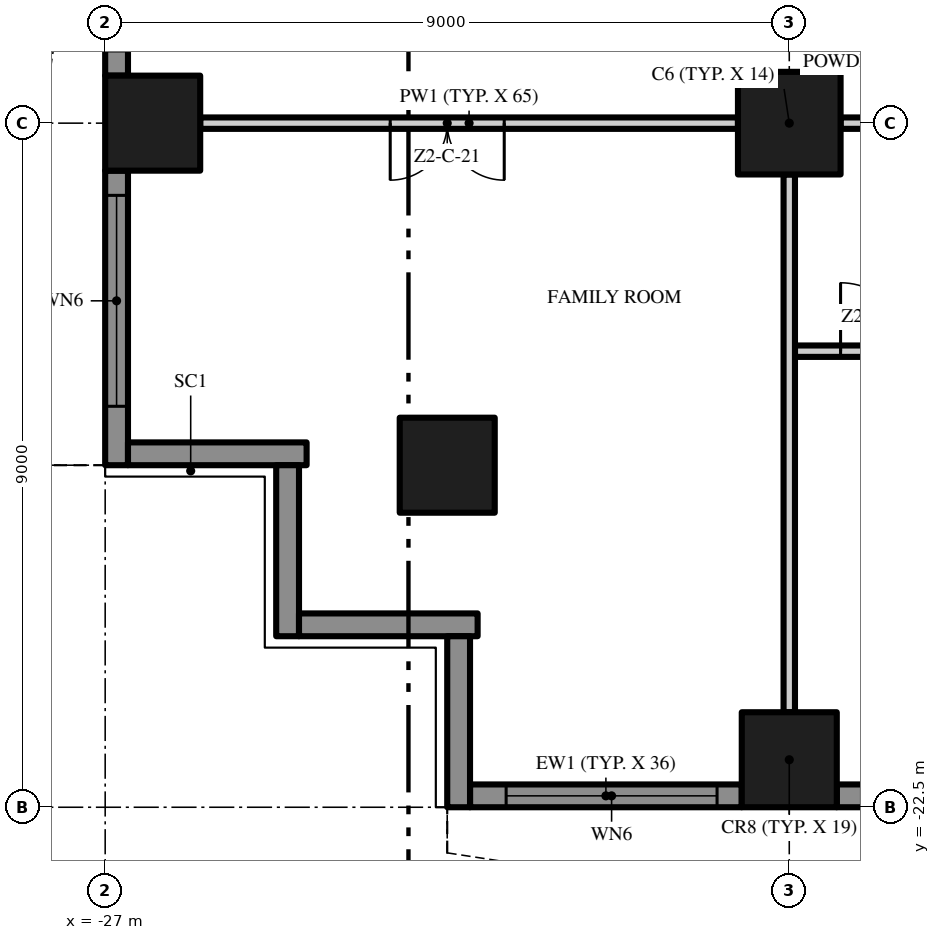
"""IFC4 building model, lengths in metres.
Left out: names, types, materials, properties, quantities, classifications, styles, units other than length and angle.
Written with IfcOpenShell. Run it as: python <this file> out.ifc"""

import sys

from ifc_helpers import new_model, si_unit, direction, frame, frame_2d, origin, origin_2d, place, context, subcontext, project, spatial, polyline, rectangle, outline, extrude, element, fill, save


model = new_model("IFC4")
c1 = context("Model", 3, precision=1e-05, world=origin(), true_north=direction((0.0, 1.0)))
c2 = subcontext(c1, "Body", "Model", "MODEL_VIEW")
j1 = project(units=[si_unit("LENGTHUNIT", "METRE"), si_unit("PLANEANGLEUNIT", "RADIAN")], contexts=[c1])
p1 = place(None, origin())
s1 = spatial("IfcSite", under=j1, at=p1, CompositionType="ELEMENT")
p2 = place(p1, origin())
s2 = spatial("IfcBuilding", under=s1, at=p2, CompositionType="ELEMENT")
p3 = place(p2, frame((0.0, 0.0, 99.8)))
s3 = spatial("IfcBuildingStorey", under=s2, at=p3, CompositionType="ELEMENT", Elevation=99.8)
p4 = place(p3, frame((-18.0, -13.5, 0.0), z_axis=(0.0, 0.0, 1.0), x_axis=(1.0, 0.0, 0.0)))
e1 = element("IfcColumn", 1, at=p4, inside=s3, PredefinedType="COLUMN", context=c2, shape_type="SweptSolid", body=[
    extrude(rectangle(XDim=1.35, YDim=1.35, at=origin_2d()), origin(), (0.0, 0.0, 1.0), 3.5),
])
for number, where, z_axis, x_axis in (
    (2, (-18.0, -21.875, 0.0), (0.0, 0.0, 1.0), (1.0, 0.0, 0.0)),
    (3, (-26.375, -13.5, 0.0), (0.0, 0.0, 1.0), (1.0, 0.0, 0.0)),
    (4, (-22.5, -18.0, 0.0), (0.0, 0.0, 1.0), (1.0, 0.0, 0.0)),
):
    element("IfcColumn", number, at=place(p3, frame(where, z_axis=z_axis, x_axis=x_axis)), inside=s3, PredefinedType="COLUMN", context=c2, shape_type="SweptSolid", body=[
        extrude(rectangle(XDim=1.25, YDim=1.25, at=origin_2d()), origin(), (0.0, 0.0, 1.0), 3.5),
    ])
p5 = place(p3, frame((-18.625, -22.35, 0.0), z_axis=(0.0, 0.0, 1.0), x_axis=(-1.0, 0.0, 0.0)))
e5 = element("IfcWall", 5, at=p5, inside=s3, PredefinedType="SOLIDWALL", context=c2, shape_type="SweptSolid", body=[
    extrude(rectangle(XDim=3.575, YDim=0.3, at=frame_2d((1.788, 0.0))), origin(), (0.0, 0.0, 1.0), 3.5),
])
p6 = place(p5, frame((0.325, 0.0, 0.45)))
e6 = element("IfcOpeningElement", 6, at=p6, cuts=e5, PredefinedType="OPENING", context=c2, shape_type="SweptSolid", body=[
    extrude(rectangle(XDim=2.775, YDim=2.65, at=frame_2d((1.387, 1.325))), frame((0.0, 0.16, 0.0), z_axis=(0.0, -1.0, 0.0), x_axis=(1.0, 0.0, 0.0)), (0.0, 0.0, 1.0), 0.32),
])
p7 = place(p3, frame((-9.625, -22.35, 0.0), z_axis=(0.0, 0.0, 1.0), x_axis=(-1.0, 0.0, 0.0)))
e7 = element("IfcWall", 7, at=p7, inside=s3, PredefinedType="SOLIDWALL", context=c2, shape_type="SweptSolid", body=[
    extrude(rectangle(XDim=7.75, YDim=0.3, at=frame_2d((3.875, 0.0))), origin(), (0.0, 0.0, 1.0), 3.5),
])
p8 = place(p7, frame((4.65, 0.0, 0.0)))
e8 = element("IfcOpeningElement", 8, at=p8, cuts=e7, PredefinedType="OPENING", context=c2, shape_type="SweptSolid", body=[
    extrude(rectangle(XDim=2.775, YDim=2.4, at=frame_2d((1.387, 1.2))), frame((0.0, 0.16, 0.0), z_axis=(0.0, -1.0, 0.0), x_axis=(1.0, 0.0, 0.0)), (0.0, 0.0, 1.0), 0.32),
])
p9 = place(p7, frame((0.325, 0.0, 0.45)))
e9 = element("IfcOpeningElement", 9, at=p9, cuts=e7, PredefinedType="OPENING", context=c2, shape_type="SweptSolid", body=[
    extrude(rectangle(XDim=2.775, YDim=2.65, at=frame_2d((1.387, 1.325))), frame((0.0, 0.16, 0.0), z_axis=(0.0, -1.0, 0.0), x_axis=(1.0, 0.0, 0.0)), (0.0, 0.0, 1.0), 0.32),
])
p10 = place(p3, frame((-26.85, -12.875, 0.0), z_axis=(0.0, 0.0, 1.0), x_axis=(0.0, 1.0, 0.0)))
e10 = element("IfcWall", 10, at=p10, inside=s3, PredefinedType="SOLIDWALL", context=c2, shape_type="SweptSolid", body=[
    extrude(rectangle(XDim=7.75, YDim=0.3, at=frame_2d((3.875, 0.0))), origin(), (0.0, 0.0, 1.0), 3.5),
])
p11 = place(p10, frame((4.65, 0.0, 0.0)))
e11 = element("IfcOpeningElement", 11, at=p11, cuts=e10, PredefinedType="OPENING", context=c2, shape_type="SweptSolid", body=[
    extrude(rectangle(XDim=2.775, YDim=2.4, at=frame_2d((1.387, 1.2))), frame((0.0, 0.16, 0.0), z_axis=(0.0, -1.0, 0.0), x_axis=(1.0, 0.0, 0.0)), (0.0, 0.0, 1.0), 0.32),
])
p12 = place(p10, frame((0.325, 0.0, 0.45)))
e12 = element("IfcOpeningElement", 12, at=p12, cuts=e10, PredefinedType="OPENING", context=c2, shape_type="SweptSolid", body=[
    extrude(rectangle(XDim=2.775, YDim=2.65, at=frame_2d((1.387, 1.325))), frame((0.0, 0.16, 0.0), z_axis=(0.0, -1.0, 0.0), x_axis=(1.0, 0.0, 0.0)), (0.0, 0.0, 1.0), 0.32),
])
p13 = place(p3, frame((-26.85, -18.0, 0.0), z_axis=(0.0, 0.0, 1.0), x_axis=(0.0, 1.0, 0.0)))
e13 = element("IfcWall", 13, at=p13, inside=s3, PredefinedType="SOLIDWALL", context=c2, shape_type="SweptSolid", body=[
    extrude(rectangle(XDim=3.875, YDim=0.3, at=frame_2d((1.938, 0.0))), origin(), (0.0, 0.0, 1.0), 3.5),
])
p14 = place(p13, frame((0.775, 0.0, 0.45)))
e14 = element("IfcOpeningElement", 14, at=p14, cuts=e13, PredefinedType="OPENING", context=c2, shape_type="SweptSolid", body=[
    extrude(rectangle(XDim=2.775, YDim=2.65, at=frame_2d((1.387, 1.325))), frame((0.0, 0.16, 0.0), z_axis=(0.0, -1.0, 0.0), x_axis=(1.0, 0.0, 0.0)), (0.0, 0.0, 1.0), 0.32),
])
p15 = place(p3, frame((-24.35, -17.85, 0.0), z_axis=(0.0, 0.0, 1.0), x_axis=(-1.0, 0.0, 0.0)))
e15 = element("IfcWall", 15, at=p15, inside=s3, PredefinedType="SOLIDWALL", context=c2, shape_type="SweptSolid", body=[
    extrude(rectangle(XDim=2.35, YDim=0.3, at=frame_2d((1.175, 0.0))), origin(), (0.0, 0.0, 1.0), 3.5),
])
p16 = place(p3, frame((-24.6, -20.25, 0.0), z_axis=(0.0, 0.0, 1.0), x_axis=(0.0, 1.0, 0.0)))
e16 = element("IfcWall", 16, at=p16, inside=s3, PredefinedType="SOLIDWALL", context=c2, shape_type="SweptSolid", body=[
    extrude(rectangle(XDim=2.25, YDim=0.3, at=frame_2d((1.125, 0.0))), origin(), (0.0, 0.0, 1.0), 3.5),
])
p17 = place(p3, frame((-22.1, -20.1, 0.0), z_axis=(0.0, 0.0, 1.0), x_axis=(-1.0, 0.0, 0.0)))
e17 = element("IfcWall", 17, at=p17, inside=s3, PredefinedType="SOLIDWALL", context=c2, shape_type="SweptSolid", body=[
    extrude(rectangle(XDim=2.35, YDim=0.3, at=frame_2d((1.175, 0.0))), origin(), (0.0, 0.0, 1.0), 3.5),
])
p18 = place(p3, frame((-22.35, -22.5, 0.0), z_axis=(0.0, 0.0, 1.0), x_axis=(0.0, 1.0, 0.0)))
e18 = element("IfcWall", 18, at=p18, inside=s3, PredefinedType="SOLIDWALL", context=c2, shape_type="SweptSolid", body=[
    extrude(rectangle(XDim=2.25, YDim=0.3, at=frame_2d((1.125, 0.0))), origin(), (0.0, 0.0, 1.0), 3.5),
])
p19 = place(p3, origin())
e19 = element("IfcWall", 19, at=p19, inside=s3, PredefinedType="USERDEFINED", context=c2, shape_type="SweptSolid", body=[
    extrude(outline(polyline([(-22.5, -23.1), (-21.0, -23.329), (-19.5, -23.929), (-18.0, -24.671), (-16.5, -25.271), (-15.0, -25.5), (-13.5, -25.271), (-12.0, -24.671), (-10.5, -23.929), (-9.0, -23.329), (-7.5, -23.1), (-6.0, -23.329), (-4.5, -23.929), (-3.0, -24.671), (-1.5, -25.271), (0.0, -25.5), (1.5, -25.271), (3.0, -24.671), (4.5, -23.929), (6.0, -23.329), (7.5, -23.1), (9.0, -23.329), (10.5, -23.929), (12.0, -24.671), (13.5, -25.271), (15.0, -25.5), (16.5, -25.271), (18.0, -24.671), (19.5, -23.929), (21.0, -23.329), (22.5, -23.1), (22.462, -22.853), (20.934, -23.086), (19.398, -23.701), (17.898, -24.442), (16.434, -25.028), (15.0, -25.247), (13.566, -25.028), (12.102, -24.442), (10.602, -23.701), (9.066, -23.086), (7.5, -22.847), (5.934, -23.086), (4.398, -23.701), (2.898, -24.442), (1.434, -25.028), (0.0, -25.247), (-1.434, -25.028), (-2.898, -24.442), (-4.398, -23.701), (-5.934, -23.086), (-7.5, -22.847), (-9.066, -23.086), (-10.602, -23.701), (-12.102, -24.442), (-13.566, -25.028), (-15.0, -25.247), (-16.434, -25.028), (-17.898, -24.442), (-19.398, -23.701), (-20.934, -23.086), (-22.462, -22.853), (-22.5, -23.1)])), origin(), (0.0, 0.0, 1.0), 0.9),
])
p20 = place(p3, origin())
e20 = element("IfcWall", 20, at=p20, inside=s3, PredefinedType="USERDEFINED", context=c2, shape_type="SweptSolid", body=[
    extrude(outline(polyline([(-27.6, 18.0), (-27.829, 16.5), (-28.429, 15.0), (-29.171, 13.5), (-29.771, 12.0), (-30.0, 10.5), (-29.771, 9.0), (-29.171, 7.5), (-28.429, 6.0), (-27.829, 4.5), (-27.6, 3.0), (-27.829, 1.5), (-28.429, 0.0), (-29.171, -1.5), (-29.771, -3.0), (-30.0, -4.5), (-29.771, -6.0), (-29.171, -7.5), (-28.429, -9.0), (-27.829, -10.5), (-27.6, -12.0), (-27.829, -13.5), (-28.429, -15.0), (-29.171, -16.5), (-29.771, -18.0), (-29.539, -18.093), (-28.942, -16.602), (-28.201, -15.102), (-27.586, -13.566), (-27.347, -12.0), (-27.586, -10.434), (-28.201, -8.898), (-28.942, -7.398), (-29.528, -5.934), (-29.747, -4.5), (-29.528, -3.066), (-28.942, -1.602), (-28.201, -0.102), (-27.586, 1.434), (-27.347, 3.0), (-27.586, 4.566), (-28.201, 6.102), (-28.942, 7.602), (-29.528, 9.066), (-29.747, 10.5), (-29.528, 11.934), (-28.942, 13.398), (-28.201, 14.898), (-27.586, 16.434), (-27.353, 17.962), (-27.6, 18.0)])), origin(), (0.0, 0.0, 1.0), 0.9),
])
p21 = place(p3, frame((-17.925, -16.5, 0.0), z_axis=(0.0, 0.0, 1.0), x_axis=(1.0, 0.0, 0.0)))
e21 = element("IfcWall", 21, at=p21, inside=s3, PredefinedType="PARTITIONING", context=c2, shape_type="SweptSolid", body=[
    extrude(rectangle(XDim=2.1, YDim=0.15, at=frame_2d((1.05, 0.0))), origin(), (0.0, 0.0, 1.0), 3.5),
])
p22 = place(p21, frame((0.6, 0.0, 0.0)))
e22 = element("IfcOpeningElement", 22, at=p22, cuts=e21, PredefinedType="OPENING", context=c2, shape_type="SweptSolid", body=[
    extrude(rectangle(XDim=0.9, YDim=2.1, at=frame_2d((0.45, 1.05))), frame((0.0, 0.085, 0.0), z_axis=(0.0, -1.0, 0.0), x_axis=(1.0, 0.0, 0.0)), (0.0, 0.0, 1.0), 0.17),
])
p23 = place(p3, frame((-18.675, -13.5, 0.0), z_axis=(0.0, 0.0, 1.0), x_axis=(-1.0, 0.0, 0.0)))
e23 = element("IfcWall", 23, at=p23, inside=s3, PredefinedType="PARTITIONING", context=c2, shape_type="SweptSolid", body=[
    extrude(rectangle(XDim=7.075, YDim=0.15, at=frame_2d((3.538, 0.0))), origin(), (0.0, 0.0, 1.0), 3.5),
])
p24 = place(p23, frame((3.075, 0.0, 0.0)))
e24 = element("IfcOpeningElement", 24, at=p24, cuts=e23, PredefinedType="OPENING", context=c2, shape_type="SweptSolid", body=[
    extrude(rectangle(XDim=1.5, YDim=2.4, at=frame_2d((0.75, 1.2))), frame((0.0, 0.085, 0.0), z_axis=(0.0, -1.0, 0.0), x_axis=(1.0, 0.0, 0.0)), (0.0, 0.0, 1.0), 0.17),
])
p25 = place(p3, frame((-9.675, -13.5, 0.0), z_axis=(0.0, 0.0, 1.0), x_axis=(-1.0, 0.0, 0.0)))
e25 = element("IfcWall", 25, at=p25, inside=s3, PredefinedType="PARTITIONING", context=c2, shape_type="SweptSolid", body=[
    extrude(rectangle(XDim=7.65, YDim=0.15, at=frame_2d((3.825, 0.0))), origin(), (0.0, 0.0, 1.0), 3.5),
])
p26 = place(p25, frame((4.025, 0.0, 0.0)))
e26 = element("IfcOpeningElement", 26, at=p26, cuts=e25, PredefinedType="OPENING", context=c2, shape_type="SweptSolid", body=[
    extrude(rectangle(XDim=1.8, YDim=2.4, at=frame_2d((0.9, 1.2))), frame((0.0, 0.085, 0.0), z_axis=(0.0, -1.0, 0.0), x_axis=(1.0, 0.0, 0.0)), (0.0, 0.0, 1.0), 0.17),
])
p27 = place(p3, frame((-18.0, -21.25, 0.0), z_axis=(0.0, 0.0, 1.0), x_axis=(0.0, 1.0, 0.0)))
e27 = element("IfcWall", 27, at=p27, inside=s3, PredefinedType="PARTITIONING", context=c2, shape_type="SweptSolid", body=[
    extrude(rectangle(XDim=7.075, YDim=0.15, at=frame_2d((3.538, 0.0))), origin(), (0.0, 0.0, 1.0), 3.5),
])
p28 = place(p6, origin())
e28 = element("IfcWindow", 28, at=p28, inside=s3, PartitioningType="SINGLE_PANEL", PredefinedType="WINDOW", context=c2, shape_type="SweptSolid", body=[
    extrude(rectangle(XDim=2.775, YDim=2.65, at=frame_2d((1.387, 1.325))), frame((0.0, 0.03, 0.0), z_axis=(0.0, -1.0, 0.0), x_axis=(1.0, 0.0, 0.0)), (0.0, 0.0, 1.0), 0.06),
])
fill(e6, e28)
p29 = place(p14, origin())
e29 = element("IfcWindow", 29, at=p29, inside=s3, PartitioningType="SINGLE_PANEL", PredefinedType="WINDOW", context=c2, shape_type="SweptSolid", body=[
    extrude(rectangle(XDim=2.775, YDim=2.65, at=frame_2d((1.387, 1.325))), frame((0.0, 0.03, 0.0), z_axis=(0.0, -1.0, 0.0), x_axis=(1.0, 0.0, 0.0)), (0.0, 0.0, 1.0), 0.06),
])
fill(e14, e29)
p30 = place(p24, origin())
e30 = element("IfcDoor", 30, at=p30, inside=s3, OperationType="DOUBLE_DOOR_SINGLE_SWING", PredefinedType="DOOR", context=c2, shape_type="SweptSolid", body=[
    extrude(rectangle(XDim=1.5, YDim=2.4, at=frame_2d((0.75, 1.2))), frame((0.0, 0.025, 0.0), z_axis=(0.0, -1.0, 0.0), x_axis=(1.0, 0.0, 0.0)), (0.0, 0.0, 1.0), 0.05),
])
fill(e24, e30)
p31 = place(p22, origin())
e31 = element("IfcDoor", 31, at=p31, inside=s3, OperationType="SINGLE_SWING_LEFT", PredefinedType="DOOR", context=c2, shape_type="SweptSolid", body=[
    extrude(rectangle(XDim=0.9, YDim=2.1, at=frame_2d((0.45, 1.05))), frame((0.0, 0.025, 0.0), z_axis=(0.0, -1.0, 0.0), x_axis=(1.0, 0.0, 0.0)), (0.0, 0.0, 1.0), 0.05),
])
fill(e22, e31)
save(model, sys.argv[1])
